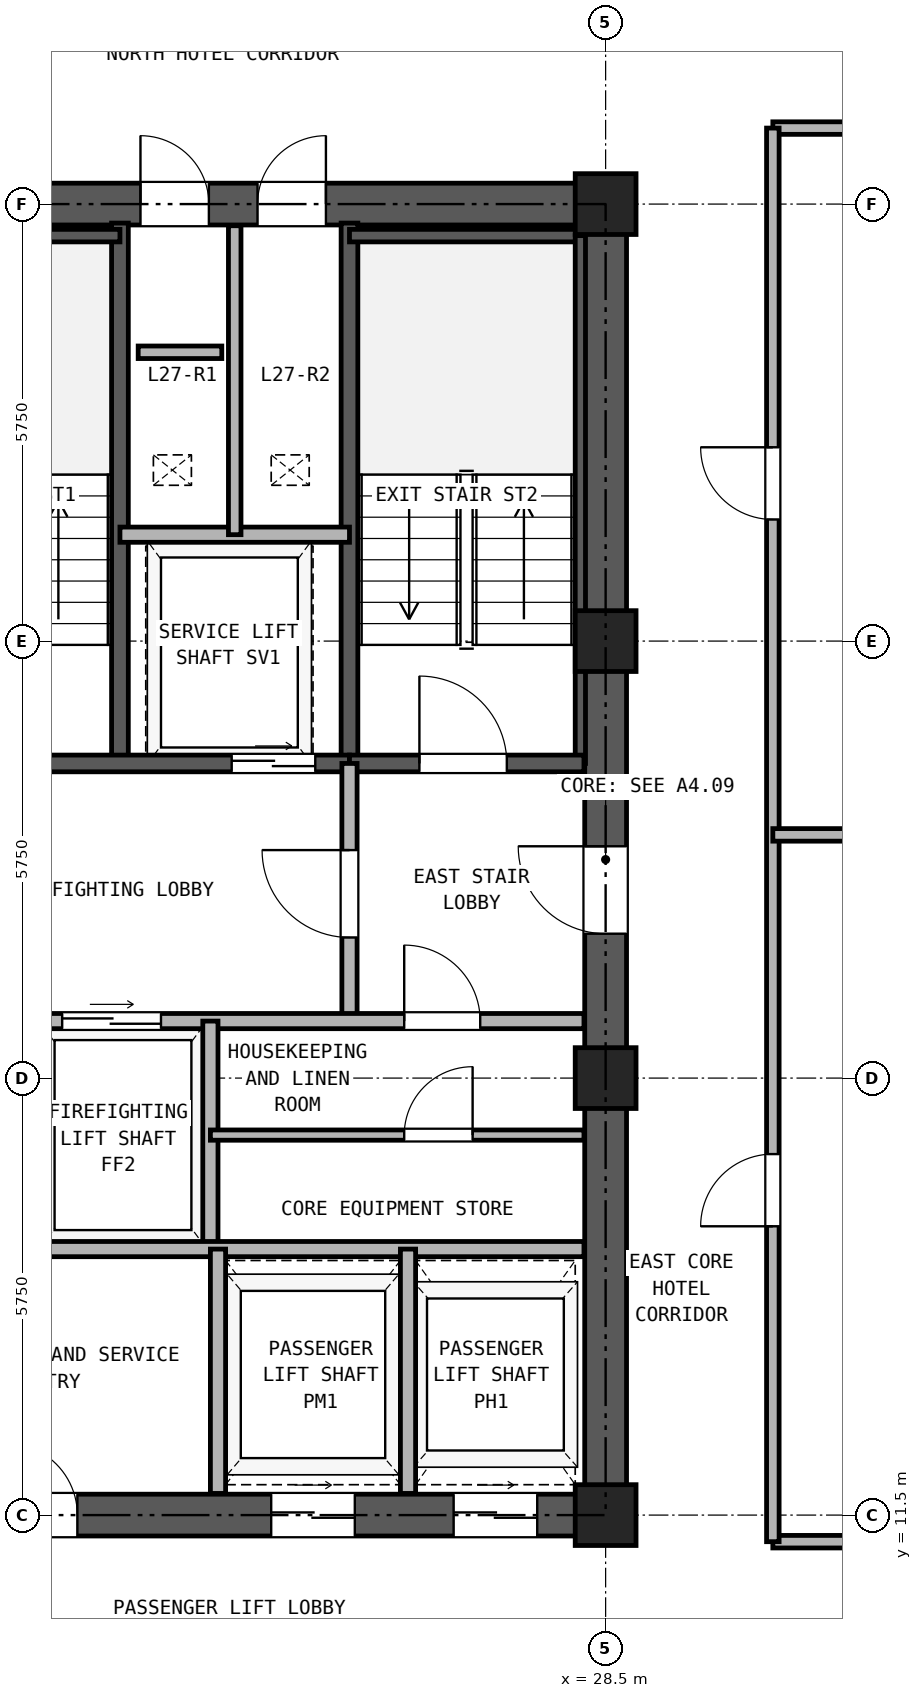
"""IFC4 building model, lengths in metres.
Left out: names, types, materials, properties, quantities, classifications, styles, units other than length and angle.
Written with IfcOpenShell. Run it as: python <this file> out.ifc"""

import sys

from ifc_helpers import new_model, si_unit, direction, frame, frame_2d, origin, origin_2d, place, context, subcontext, project, spatial, rectangle, hollow_rectangle, extrude, source, transform, mapped, element, fill, save


model = new_model("IFC4")
c1 = context("Model", 3, precision=1e-05, world=origin(), true_north=direction((0.0, 1.0)))
c2 = subcontext(c1, "Body", "Model", "MODEL_VIEW")
j1 = project(units=[si_unit("LENGTHUNIT", "METRE"), si_unit("PLANEANGLEUNIT", "RADIAN")], contexts=[c1])
p1 = place(None, origin())
s1 = spatial("IfcSite", under=j1, at=p1, CompositionType="ELEMENT")
p2 = place(p1, origin())
s2 = spatial("IfcBuilding", under=s1, at=p2, CompositionType="ELEMENT")
p3 = place(p2, frame((0.0, 0.0, 102.3)))
s3 = spatial("IfcBuildingStorey", under=s2, at=p3, CompositionType="ELEMENT", Elevation=102.3)
m1 = source(origin(), c2, "Body", "SweptSolid", [
    extrude(hollow_rectangle(XDim=0.8, YDim=0.8, WallThickness=0.045, at=origin_2d()), origin(), (0.0, 0.0, 1.0), 2.95),
])
for number, where, z_axis, x_axis in (
    (1, (28.5, 11.5, 0.0), (0.0, 0.0, 1.0), (1.0, 0.0, 0.0)),
    (2, (28.5, 17.25, 0.0), (0.0, 0.0, 1.0), (1.0, 0.0, 0.0)),
    (3, (28.5, 23.0, 0.0), (0.0, 0.0, 1.0), (1.0, 0.0, 0.0)),
    (4, (28.5, 28.75, 0.0), (0.0, 0.0, 1.0), (1.0, 0.0, 0.0)),
):
    element("IfcColumn", number, at=place(p3, frame(where, z_axis=z_axis, x_axis=x_axis)), inside=s3, PredefinedType="COLUMN", context=c2, shape_type="MappedRepresentation", body=[
        mapped(m1, transform((0.0, 0.0, 0.0), x_axis=(1.0, 0.0, 0.0), y_axis=(0.0, 1.0, 0.0), z_axis=(0.0, 0.0, 1.0), scale=1.0)),
    ])
p4 = place(p3, frame((18.225, 11.5, 0.0), z_axis=(0.0, 0.0, 1.0), x_axis=(1.0, 0.0, 0.0)))
e5 = element("IfcWall", 5, at=p4, inside=s3, PredefinedType="SHEAR", context=c2, shape_type="SweptSolid", body=[
    extrude(rectangle(XDim=10.55, YDim=0.55, at=frame_2d((5.275, 0.0))), origin(), (0.0, 0.0, 1.0), 2.95),
])
p5 = place(p4, frame((2.375, 0.0, 0.0)))
e6 = element("IfcOpeningElement", 6, at=p5, cuts=e5, PredefinedType="OPENING", context=c2, shape_type="SweptSolid", body=[
    extrude(rectangle(XDim=0.95, YDim=2.15, at=frame_2d((0.475, 1.075))), frame((0.0, 0.285, 0.0), z_axis=(0.0, -1.0, 0.0), x_axis=(1.0, 0.0, 0.0)), (0.0, 0.0, 1.0), 0.57),
])
p6 = place(p4, frame((5.875, 0.0, 0.0)))
e7 = element("IfcOpeningElement", 7, at=p6, cuts=e5, PredefinedType="OPENING", context=c2, shape_type="SweptSolid", body=[
    extrude(rectangle(XDim=1.1, YDim=2.25, at=frame_2d((0.55, 1.125))), frame((0.0, 0.285, 0.0), z_axis=(0.0, -1.0, 0.0), x_axis=(1.0, 0.0, 0.0)), (0.0, 0.0, 1.0), 0.57),
])
p7 = place(p4, frame((8.275, 0.0, 0.0)))
e8 = element("IfcOpeningElement", 8, at=p7, cuts=e5, PredefinedType="OPENING", context=c2, shape_type="SweptSolid", body=[
    extrude(rectangle(XDim=1.1, YDim=2.25, at=frame_2d((0.55, 1.125))), frame((0.0, 0.285, 0.0), z_axis=(0.0, -1.0, 0.0), x_axis=(1.0, 0.0, 0.0)), (0.0, 0.0, 1.0), 0.57),
])
p8 = place(p3, frame((18.225, 28.75, 0.0), z_axis=(0.0, 0.0, 1.0), x_axis=(1.0, 0.0, 0.0)))
e9 = element("IfcWall", 9, at=p8, inside=s3, PredefinedType="SHEAR", context=c2, shape_type="SweptSolid", body=[
    extrude(rectangle(XDim=10.55, YDim=0.55, at=frame_2d((5.275, 0.0))), origin(), (0.0, 0.0, 1.0), 2.95),
])
p9 = place(p8, frame((4.155, 0.0, 0.0)))
e10 = element("IfcOpeningElement", 10, at=p9, cuts=e9, PredefinedType="OPENING", context=c2, shape_type="SweptSolid", body=[
    extrude(rectangle(XDim=0.9, YDim=2.05, at=frame_2d((0.45, 1.025))), frame((0.0, 0.285, 0.0), z_axis=(0.0, -1.0, 0.0), x_axis=(1.0, 0.0, 0.0)), (0.0, 0.0, 1.0), 0.57),
])
p10 = place(p8, frame((5.695, 0.0, 0.0)))
e11 = element("IfcOpeningElement", 11, at=p10, cuts=e9, PredefinedType="OPENING", context=c2, shape_type="SweptSolid", body=[
    extrude(rectangle(XDim=0.9, YDim=2.05, at=frame_2d((0.45, 1.025))), frame((0.0, 0.285, 0.0), z_axis=(0.0, -1.0, 0.0), x_axis=(1.0, 0.0, 0.0)), (0.0, 0.0, 1.0), 0.57),
])
p11 = place(p3, frame((28.5, 11.775, 0.0), z_axis=(0.0, 0.0, 1.0), x_axis=(0.0, 1.0, 0.0)))
e12 = element("IfcWall", 12, at=p11, inside=s3, PredefinedType="SHEAR", context=c2, shape_type="SweptSolid", body=[
    extrude(rectangle(XDim=16.7, YDim=0.55, at=frame_2d((8.35, 0.0))), origin(), (0.0, 0.0, 1.0), 2.95),
])
p12 = place(p11, frame((7.375, 0.0, 0.0)))
e13 = element("IfcOpeningElement", 13, at=p12, cuts=e12, PredefinedType="OPENING", context=c2, shape_type="SweptSolid", body=[
    extrude(rectangle(XDim=1.15, YDim=2.2, at=frame_2d((0.575, 1.1))), frame((0.0, 0.285, 0.0), z_axis=(0.0, -1.0, 0.0), x_axis=(1.0, 0.0, 0.0)), (0.0, 0.0, 1.0), 0.57),
])
for number, where, z_axis, x_axis in (
    (14, (22.11, 21.39, 0.0), (0.0, 0.0, 1.0), (0.0, 1.0, 0.0)),
    (15, (25.13, 21.39, 0.0), (0.0, 0.0, 1.0), (0.0, 1.0, 0.0)),
):
    element("IfcWall", number, at=place(p3, frame(where, z_axis=z_axis, x_axis=x_axis)), inside=s3, PredefinedType="SOLIDWALL", context=c2, shape_type="SweptSolid", body=[
        extrude(rectangle(XDim=7.11, YDim=0.22, at=frame_2d((3.555, 0.0))), origin(), (0.0, 0.0, 1.0), 2.95),
    ])
p13 = place(p3, frame((18.785, 28.335, 0.0), z_axis=(0.0, 0.0, 1.0), x_axis=(1.0, 0.0, 0.0)))
e16 = element("IfcWall", 16, at=p13, inside=s3, PredefinedType="PARTITIONING", context=c2, shape_type="SweptSolid", body=[
    extrude(rectangle(XDim=3.325, YDim=0.165, at=frame_2d((1.663, 0.0))), origin(), (0.0, 0.0, 1.0), 2.95),
])
p14 = place(p3, frame((25.13, 28.335, 0.0), z_axis=(0.0, 0.0, 1.0), x_axis=(1.0, 0.0, 0.0)))
e17 = element("IfcWall", 17, at=p14, inside=s3, PredefinedType="PARTITIONING", context=c2, shape_type="SweptSolid", body=[
    extrude(rectangle(XDim=3.085, YDim=0.165, at=frame_2d((1.542, 0.0))), origin(), (0.0, 0.0, 1.0), 2.95),
])
p15 = place(p3, frame((28.167, 21.39, 0.0), z_axis=(0.0, 0.0, 1.0), x_axis=(0.0, 1.0, 0.0)))
e18 = element("IfcWall", 18, at=p15, inside=s3, PredefinedType="PARTITIONING", context=c2, shape_type="SweptSolid", body=[
    extrude(rectangle(XDim=6.945, YDim=0.135, at=frame_2d((3.473, 0.0))), origin(), (0.0, 0.0, 1.0), 2.95),
])
p16 = place(p3, frame((18.785, 21.39, 0.0), z_axis=(0.0, 0.0, 1.0), x_axis=(1.0, 0.0, 0.0)))
e19 = element("IfcWall", 19, at=p16, inside=s3, PredefinedType="SOLIDWALL", context=c2, shape_type="SweptSolid", body=[
    extrude(rectangle(XDim=6.345, YDim=0.22, at=frame_2d((3.172, 0.0))), origin(), (0.0, 0.0, 1.0), 2.95),
])
p17 = place(p16, frame((1.065, 0.0, 0.0)))
e20 = element("IfcOpeningElement", 20, at=p17, cuts=e19, PredefinedType="OPENING", context=c2, shape_type="SweptSolid", body=[
    extrude(rectangle(XDim=1.15, YDim=2.2, at=frame_2d((0.575, 1.1))), frame((0.0, 0.12, 0.0), z_axis=(0.0, -1.0, 0.0), x_axis=(1.0, 0.0, 0.0)), (0.0, 0.0, 1.0), 0.24),
])
p18 = place(p16, frame((4.795, 0.0, 0.0)))
e21 = element("IfcOpeningElement", 21, at=p18, cuts=e19, PredefinedType="OPENING", context=c2, shape_type="SweptSolid", body=[
    extrude(rectangle(XDim=1.1, YDim=2.25, at=frame_2d((0.55, 1.125))), frame((0.0, 0.12, 0.0), z_axis=(0.0, -1.0, 0.0), x_axis=(1.0, 0.0, 0.0)), (0.0, 0.0, 1.0), 0.24),
])
p19 = place(p3, frame((25.13, 21.39, 0.0), z_axis=(0.0, 0.0, 1.0), x_axis=(1.0, 0.0, 0.0)))
e22 = element("IfcWall", 22, at=p19, inside=s3, PredefinedType="SOLIDWALL", context=c2, shape_type="SweptSolid", body=[
    extrude(rectangle(XDim=3.085, YDim=0.22, at=frame_2d((1.542, 0.0))), origin(), (0.0, 0.0, 1.0), 2.95),
])
p20 = place(p19, frame((0.92, 0.0, 0.0)))
e23 = element("IfcOpeningElement", 23, at=p20, cuts=e22, PredefinedType="OPENING", context=c2, shape_type="SweptSolid", body=[
    extrude(rectangle(XDim=1.15, YDim=2.2, at=frame_2d((0.575, 1.1))), frame((0.0, 0.12, 0.0), z_axis=(0.0, -1.0, 0.0), x_axis=(1.0, 0.0, 0.0)), (0.0, 0.0, 1.0), 0.24),
])
p21 = place(p3, frame((22.11, 24.4, 0.0), z_axis=(0.0, 0.0, 1.0), x_axis=(1.0, 0.0, 0.0)))
e24 = element("IfcWall", 24, at=p21, inside=s3, PredefinedType="PARTITIONING", context=c2, shape_type="SweptSolid", body=[
    extrude(rectangle(XDim=3.02, YDim=0.2, at=frame_2d((1.51, 0.0))), origin(), (0.0, 0.0, 1.0), 2.95),
])
p22 = place(p3, frame((23.62, 24.4, 0.0), z_axis=(0.0, 0.0, 1.0), x_axis=(0.0, 1.0, 0.0)))
e25 = element("IfcWall", 25, at=p22, inside=s3, PredefinedType="PARTITIONING", context=c2, shape_type="SweptSolid", body=[
    extrude(rectangle(XDim=4.065, YDim=0.165, at=frame_2d((2.033, 0.0))), origin(), (0.0, 0.0, 1.0), 2.95),
])
p23 = place(p3, frame((25.13, 18.0, 0.0), z_axis=(0.0, 0.0, 1.0), x_axis=(0.0, 1.0, 0.0)))
e26 = element("IfcWall", 26, at=p23, inside=s3, PredefinedType="PARTITIONING", context=c2, shape_type="SweptSolid", body=[
    extrude(rectangle(XDim=3.39, YDim=0.2, at=frame_2d((1.695, 0.0))), origin(), (0.0, 0.0, 1.0), 2.95),
])
p24 = place(p23, frame((1.1, 0.0, 0.0)))
e27 = element("IfcOpeningElement", 27, at=p24, cuts=e26, PredefinedType="OPENING", context=c2, shape_type="SweptSolid", body=[
    extrude(rectangle(XDim=1.15, YDim=2.2, at=frame_2d((0.575, 1.1))), frame((0.0, 0.11, 0.0), z_axis=(0.0, -1.0, 0.0), x_axis=(1.0, 0.0, 0.0)), (0.0, 0.0, 1.0), 0.22),
])
p25 = place(p3, frame((18.785, 18.0, 0.0), z_axis=(0.0, 0.0, 1.0), x_axis=(1.0, 0.0, 0.0)))
e28 = element("IfcWall", 28, at=p25, inside=s3, PredefinedType="PARTITIONING", context=c2, shape_type="SweptSolid", body=[
    extrude(rectangle(XDim=9.43, YDim=0.2, at=frame_2d((4.715, 0.0))), origin(), (0.0, 0.0, 1.0), 2.95),
])
p26 = place(p25, frame((0.465, 0.0, 0.0)))
e29 = element("IfcOpeningElement", 29, at=p26, cuts=e28, PredefinedType="OPENING", context=c2, shape_type="SweptSolid", body=[
    extrude(rectangle(XDim=1.3, YDim=2.3, at=frame_2d((0.65, 1.15))), frame((0.0, 0.11, 0.0), z_axis=(0.0, -1.0, 0.0), x_axis=(1.0, 0.0, 0.0)), (0.0, 0.0, 1.0), 0.22),
])
p27 = place(p25, frame((2.565, 0.0, 0.0)))
e30 = element("IfcOpeningElement", 30, at=p27, cuts=e28, PredefinedType="OPENING", context=c2, shape_type="SweptSolid", body=[
    extrude(rectangle(XDim=1.3, YDim=2.3, at=frame_2d((0.65, 1.15))), frame((0.0, 0.11, 0.0), z_axis=(0.0, -1.0, 0.0), x_axis=(1.0, 0.0, 0.0)), (0.0, 0.0, 1.0), 0.22),
])
p28 = place(p25, frame((7.065, 0.0, 0.0)))
e31 = element("IfcOpeningElement", 31, at=p28, cuts=e28, PredefinedType="OPENING", context=c2, shape_type="SweptSolid", body=[
    extrude(rectangle(XDim=1.0, YDim=2.15, at=frame_2d((0.5, 1.075))), frame((0.0, 0.11, 0.0), z_axis=(0.0, -1.0, 0.0), x_axis=(1.0, 0.0, 0.0)), (0.0, 0.0, 1.0), 0.22),
])
p29 = place(p3, frame((23.3, 15.0, 0.0), z_axis=(0.0, 0.0, 1.0), x_axis=(0.0, 1.0, 0.0)))
e32 = element("IfcWall", 32, at=p29, inside=s3, PredefinedType="PARTITIONING", context=c2, shape_type="SweptSolid", body=[
    extrude(rectangle(XDim=3.0, YDim=0.2, at=frame_2d((1.5, 0.0))), origin(), (0.0, 0.0, 1.0), 2.95),
])
p30 = place(p3, frame((18.785, 15.0, 0.0), z_axis=(0.0, 0.0, 1.0), x_axis=(1.0, 0.0, 0.0)))
e33 = element("IfcWall", 33, at=p30, inside=s3, PredefinedType="PARTITIONING", context=c2, shape_type="SweptSolid", body=[
    extrude(rectangle(XDim=9.43, YDim=0.2, at=frame_2d((4.715, 0.0))), origin(), (0.0, 0.0, 1.0), 2.95),
])
p31 = place(p3, frame((23.3, 16.5, 0.0), z_axis=(0.0, 0.0, 1.0), x_axis=(1.0, 0.0, 0.0)))
e34 = element("IfcWall", 34, at=p31, inside=s3, PredefinedType="PARTITIONING", context=c2, shape_type="SweptSolid", body=[
    extrude(rectangle(XDim=4.915, YDim=0.135, at=frame_2d((2.458, 0.0))), origin(), (0.0, 0.0, 1.0), 2.95),
])
p32 = place(p31, frame((2.55, 0.0, 0.0)))
e35 = element("IfcOpeningElement", 35, at=p32, cuts=e34, PredefinedType="OPENING", context=c2, shape_type="SweptSolid", body=[
    extrude(rectangle(XDim=0.9, YDim=2.05, at=frame_2d((0.45, 1.025))), frame((0.0, 0.077, 0.0), z_axis=(0.0, -1.0, 0.0), x_axis=(1.0, 0.0, 0.0)), (0.0, 0.0, 1.0), 0.155),
])
for number, where, z_axis, x_axis in (
    (36, (23.4, 11.785, 0.0), (0.0, 0.0, 1.0), (0.0, 1.0, 0.0)),
    (37, (25.9, 11.785, 0.0), (0.0, 0.0, 1.0), (0.0, 1.0, 0.0)),
):
    element("IfcWall", number, at=place(p3, frame(where, z_axis=z_axis, x_axis=x_axis)), inside=s3, PredefinedType="PARTITIONING", context=c2, shape_type="SweptSolid", body=[
        extrude(rectangle(XDim=3.215, YDim=0.2, at=frame_2d((1.607, 0.0))), origin(), (0.0, 0.0, 1.0), 2.95),
    ])
for number, where, z_axis, x_axis in (
    (38, (30.7, 11.15, 0.0), (0.0, 0.0, 1.0), (1.0, 0.0, 0.0)),
    (39, (30.7, 29.75, 0.0), (0.0, 0.0, 1.0), (1.0, 0.0, 0.0)),
):
    element("IfcWall", number, at=place(p3, frame(where, z_axis=z_axis, x_axis=x_axis)), inside=s3, PredefinedType="PARTITIONING", context=c2, shape_type="SweptSolid", body=[
        extrude(rectangle(XDim=7.1, YDim=0.165, at=frame_2d((3.55, 0.0))), origin(), (0.0, 0.0, 1.0), 2.95),
    ])
p33 = place(p3, frame((30.7, 11.15, 0.0), z_axis=(0.0, 0.0, 1.0), x_axis=(0.0, 1.0, 0.0)))
e40 = element("IfcWall", 40, at=p33, inside=s3, PredefinedType="PARTITIONING", context=c2, shape_type="SweptSolid", body=[
    extrude(rectangle(XDim=18.6, YDim=0.165, at=frame_2d((9.3, 0.0))), origin(), (0.0, 0.0, 1.0), 2.95),
])
p34 = place(p33, frame((4.15, 0.0, 0.0)))
e41 = element("IfcOpeningElement", 41, at=p34, cuts=e40, PredefinedType="OPENING", context=c2, shape_type="SweptSolid", body=[
    extrude(rectangle(XDim=0.95, YDim=2.15, at=frame_2d((0.475, 1.075))), frame((0.0, 0.093, 0.0), z_axis=(0.0, -1.0, 0.0), x_axis=(1.0, 0.0, 0.0)), (0.0, 0.0, 1.0), 0.185),
])
p35 = place(p33, frame((13.45, 0.0, 0.0)))
e42 = element("IfcOpeningElement", 42, at=p35, cuts=e40, PredefinedType="OPENING", context=c2, shape_type="SweptSolid", body=[
    extrude(rectangle(XDim=0.95, YDim=2.15, at=frame_2d((0.475, 1.075))), frame((0.0, 0.093, 0.0), z_axis=(0.0, -1.0, 0.0), x_axis=(1.0, 0.0, 0.0)), (0.0, 0.0, 1.0), 0.185),
])
p36 = place(p3, frame((30.7, 20.45, 0.0), z_axis=(0.0, 0.0, 1.0), x_axis=(1.0, 0.0, 0.0)))
e43 = element("IfcWall", 43, at=p36, inside=s3, PredefinedType="PARTITIONING", context=c2, shape_type="SweptSolid", body=[
    extrude(rectangle(XDim=16.14, YDim=0.165, at=frame_2d((8.07, 0.0))), origin(), (0.0, 0.0, 1.0), 2.95),
])
p37 = place(p3, frame((22.35, 26.8, 0.0), z_axis=(0.0, 0.0, 1.0), x_axis=(1.0, 0.0, 0.0)))
e44 = element("IfcWall", 44, at=p37, inside=s3, PredefinedType="PARTITIONING", context=c2, shape_type="SweptSolid", body=[
    extrude(rectangle(XDim=1.1, YDim=0.165, at=frame_2d((0.55, 0.0))), origin(), (0.0, 0.0, 1.0), 2.95),
])
p38 = place(p20, frame((1.15, 0.0, 0.0), z_axis=(0.0, 0.0, 1.0), x_axis=(-1.0, 0.0, 0.0)))
e45 = element("IfcDoor", 45, at=p38, inside=s3, OperationType="SINGLE_SWING_LEFT", PredefinedType="DOOR", context=c2, shape_type="SweptSolid", body=[
    extrude(rectangle(XDim=1.15, YDim=2.2, at=frame_2d((0.575, 1.1))), frame((0.0, 0.025, 0.0), z_axis=(0.0, -1.0, 0.0), x_axis=(1.0, 0.0, 0.0)), (0.0, 0.0, 1.0), 0.05),
])
fill(e23, e45)
p39 = place(p18, frame((1.1, 0.0, 0.0), z_axis=(0.0, 0.0, 1.0), x_axis=(-1.0, 0.0, 0.0)))
e46 = element("IfcDoor", 46, at=p39, inside=s3, OperationType="DOUBLE_DOOR_SLIDING", PredefinedType="DOOR", context=c2, shape_type="SweptSolid", body=[
    extrude(rectangle(XDim=1.1, YDim=2.25, at=frame_2d((0.55, 1.125))), frame((0.0, 0.025, 0.0), z_axis=(0.0, -1.0, 0.0), x_axis=(1.0, 0.0, 0.0)), (0.0, 0.0, 1.0), 0.05),
])
fill(e21, e46)
p40 = place(p24, origin())
e47 = element("IfcDoor", 47, at=p40, inside=s3, OperationType="SINGLE_SWING_RIGHT", PredefinedType="DOOR", context=c2, shape_type="SweptSolid", body=[
    extrude(rectangle(XDim=1.15, YDim=2.2, at=frame_2d((0.575, 1.1))), frame((0.0, 0.025, 0.0), z_axis=(0.0, -1.0, 0.0), x_axis=(1.0, 0.0, 0.0)), (0.0, 0.0, 1.0), 0.05),
])
fill(e27, e47)
p41 = place(p27, origin())
e48 = element("IfcDoor", 48, at=p41, inside=s3, OperationType="DOUBLE_DOOR_SLIDING", PredefinedType="DOOR", context=c2, shape_type="SweptSolid", body=[
    extrude(rectangle(XDim=1.3, YDim=2.3, at=frame_2d((0.65, 1.15))), frame((0.0, 0.025, 0.0), z_axis=(0.0, -1.0, 0.0), x_axis=(1.0, 0.0, 0.0)), (0.0, 0.0, 1.0), 0.05),
])
fill(e30, e48)
p42 = place(p28, frame((1.0, 0.0, 0.0), z_axis=(0.0, 0.0, 1.0), x_axis=(-1.0, 0.0, 0.0)))
e49 = element("IfcDoor", 49, at=p42, inside=s3, OperationType="SINGLE_SWING_LEFT", PredefinedType="DOOR", context=c2, shape_type="SweptSolid", body=[
    extrude(rectangle(XDim=1.0, YDim=2.15, at=frame_2d((0.5, 1.075))), frame((0.0, 0.025, 0.0), z_axis=(0.0, -1.0, 0.0), x_axis=(1.0, 0.0, 0.0)), (0.0, 0.0, 1.0), 0.05),
])
fill(e31, e49)
p43 = place(p32, frame((0.9, 0.0, 0.0), z_axis=(0.0, 0.0, 1.0), x_axis=(-1.0, 0.0, 0.0)))
e50 = element("IfcDoor", 50, at=p43, inside=s3, OperationType="SINGLE_SWING_RIGHT", PredefinedType="DOOR", context=c2, shape_type="SweptSolid", body=[
    extrude(rectangle(XDim=0.9, YDim=2.05, at=frame_2d((0.45, 1.025))), frame((0.0, 0.025, 0.0), z_axis=(0.0, -1.0, 0.0), x_axis=(1.0, 0.0, 0.0)), (0.0, 0.0, 1.0), 0.05),
])
fill(e35, e50)
p44 = place(p12, origin())
e51 = element("IfcDoor", 51, at=p44, inside=s3, OperationType="SINGLE_SWING_RIGHT", PredefinedType="DOOR", context=c2, shape_type="SweptSolid", body=[
    extrude(rectangle(XDim=1.15, YDim=2.2, at=frame_2d((0.575, 1.1))), frame((0.0, 0.025, 0.0), z_axis=(0.0, -1.0, 0.0), x_axis=(1.0, 0.0, 0.0)), (0.0, 0.0, 1.0), 0.05),
])
fill(e13, e51)
p45 = place(p9, origin())
e52 = element("IfcDoor", 52, at=p45, inside=s3, OperationType="SINGLE_SWING_LEFT", PredefinedType="DOOR", context=c2, shape_type="SweptSolid", body=[
    extrude(rectangle(XDim=0.9, YDim=2.05, at=frame_2d((0.45, 1.025))), frame((0.0, 0.025, 0.0), z_axis=(0.0, -1.0, 0.0), x_axis=(1.0, 0.0, 0.0)), (0.0, 0.0, 1.0), 0.05),
])
fill(e10, e52)
p46 = place(p10, origin())
e53 = element("IfcDoor", 53, at=p46, inside=s3, OperationType="SINGLE_SWING_RIGHT", PredefinedType="DOOR", context=c2, shape_type="SweptSolid", body=[
    extrude(rectangle(XDim=0.9, YDim=2.05, at=frame_2d((0.45, 1.025))), frame((0.0, 0.025, 0.0), z_axis=(0.0, -1.0, 0.0), x_axis=(1.0, 0.0, 0.0)), (0.0, 0.0, 1.0), 0.05),
])
fill(e11, e53)
p47 = place(p5, frame((0.95, 0.0, 0.0), z_axis=(0.0, 0.0, 1.0), x_axis=(-1.0, 0.0, 0.0)))
e54 = element("IfcDoor", 54, at=p47, inside=s3, OperationType="SINGLE_SWING_LEFT", PredefinedType="DOOR", context=c2, shape_type="SweptSolid", body=[
    extrude(rectangle(XDim=0.95, YDim=2.15, at=frame_2d((0.475, 1.075))), frame((0.0, 0.025, 0.0), z_axis=(0.0, -1.0, 0.0), x_axis=(1.0, 0.0, 0.0)), (0.0, 0.0, 1.0), 0.05),
])
fill(e6, e54)
p48 = place(p6, frame((1.1, 0.0, 0.0), z_axis=(0.0, 0.0, 1.0), x_axis=(-1.0, 0.0, 0.0)))
e55 = element("IfcDoor", 55, at=p48, inside=s3, OperationType="DOUBLE_DOOR_SLIDING", PredefinedType="DOOR", context=c2, shape_type="SweptSolid", body=[
    extrude(rectangle(XDim=1.1, YDim=2.25, at=frame_2d((0.55, 1.125))), frame((0.0, 0.025, 0.0), z_axis=(0.0, -1.0, 0.0), x_axis=(1.0, 0.0, 0.0)), (0.0, 0.0, 1.0), 0.05),
])
fill(e7, e55)
p49 = place(p7, frame((1.1, 0.0, 0.0), z_axis=(0.0, 0.0, 1.0), x_axis=(-1.0, 0.0, 0.0)))
e56 = element("IfcDoor", 56, at=p49, inside=s3, OperationType="DOUBLE_DOOR_SLIDING", PredefinedType="DOOR", context=c2, shape_type="SweptSolid", body=[
    extrude(rectangle(XDim=1.1, YDim=2.25, at=frame_2d((0.55, 1.125))), frame((0.0, 0.025, 0.0), z_axis=(0.0, -1.0, 0.0), x_axis=(1.0, 0.0, 0.0)), (0.0, 0.0, 1.0), 0.05),
])
fill(e8, e56)
p50 = place(p34, origin())
e57 = element("IfcDoor", 57, at=p50, inside=s3, OperationType="SINGLE_SWING_LEFT", PredefinedType="DOOR", context=c2, shape_type="SweptSolid", body=[
    extrude(rectangle(XDim=0.95, YDim=2.15, at=frame_2d((0.475, 1.075))), frame((0.0, 0.025, 0.0), z_axis=(0.0, -1.0, 0.0), x_axis=(1.0, 0.0, 0.0)), (0.0, 0.0, 1.0), 0.05),
])
fill(e41, e57)
p51 = place(p35, origin())
e58 = element("IfcDoor", 58, at=p51, inside=s3, OperationType="SINGLE_SWING_RIGHT", PredefinedType="DOOR", context=c2, shape_type="SweptSolid", body=[
    extrude(rectangle(XDim=0.95, YDim=2.15, at=frame_2d((0.475, 1.075))), frame((0.0, 0.025, 0.0), z_axis=(0.0, -1.0, 0.0), x_axis=(1.0, 0.0, 0.0)), (0.0, 0.0, 1.0), 0.05),
])
fill(e42, e58)
save(model, sys.argv[1])
